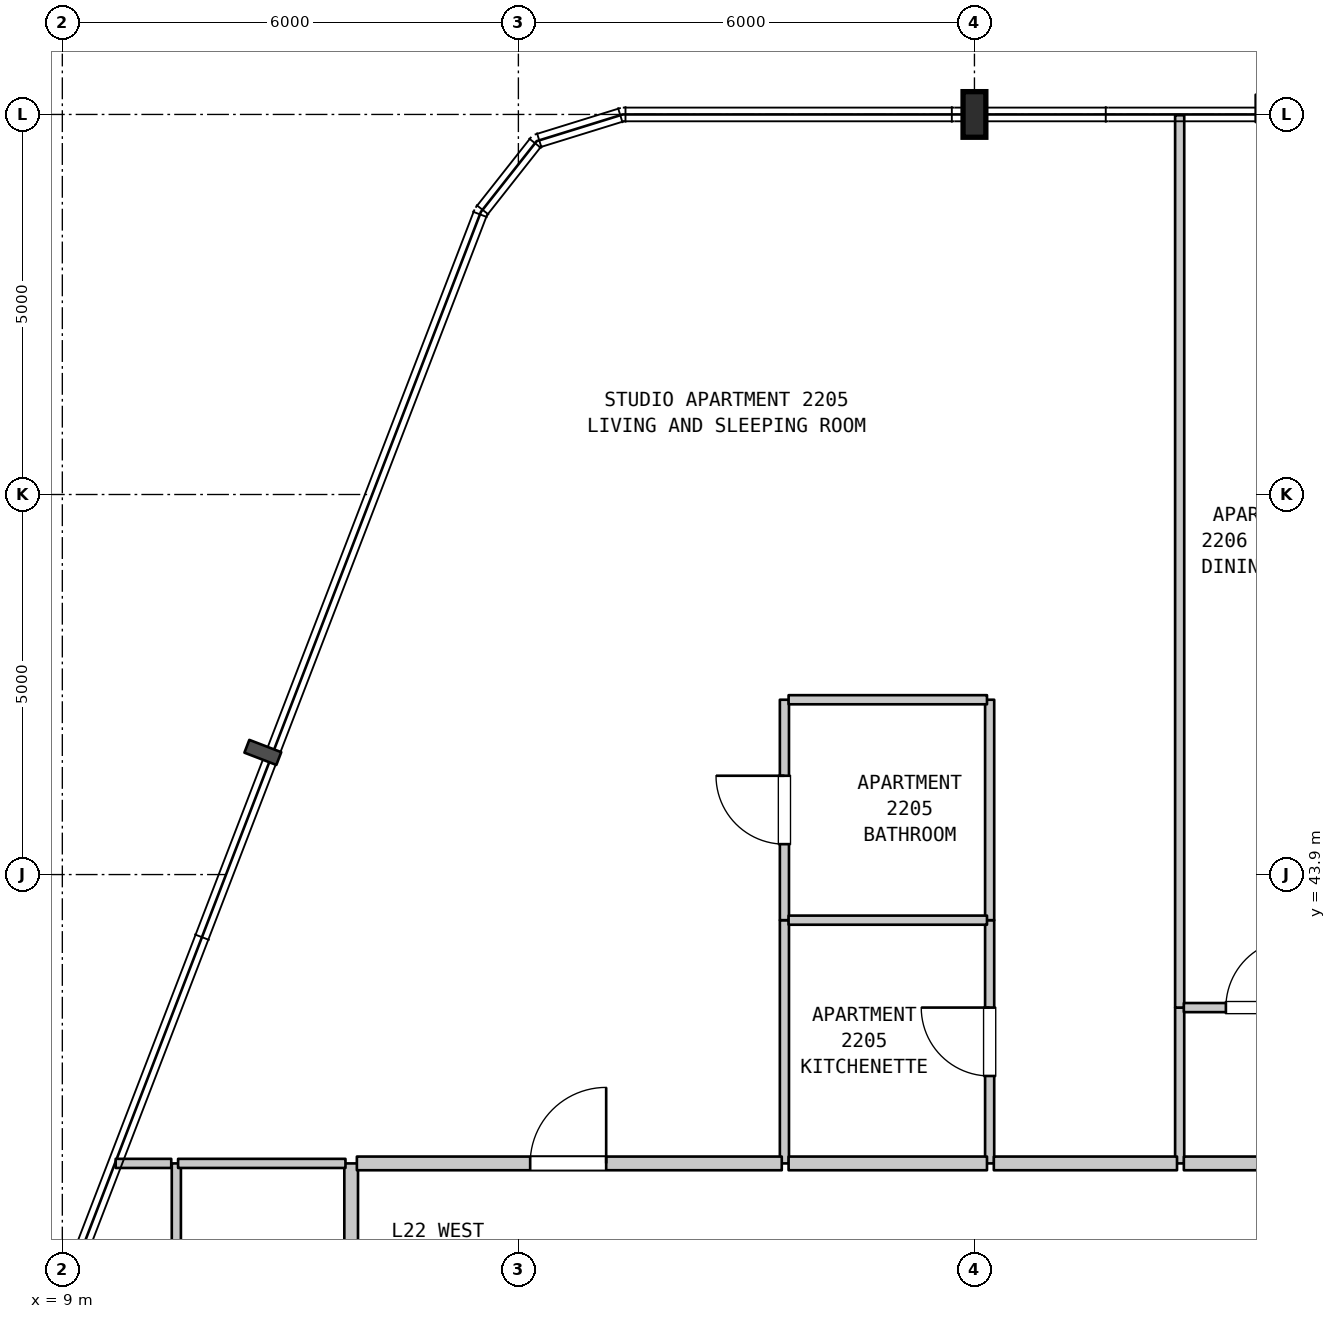
"""IFC4 building model, lengths in metres.
Left out: names, types, materials, properties, quantities, classifications, styles, units other than length and angle.
Written with IfcOpenShell. Run it as: python <this file> out.ifc"""

import sys

from ifc_helpers import new_model, si_unit, direction, frame, frame_2d, origin, origin_2d, place, context, subcontext, project, spatial, rectangle, i_section, extrude, element, fill, save


model = new_model("IFC4")
c1 = context("Model", 3, precision=1e-05, world=origin(), true_north=direction((0.0, 1.0)))
c2 = subcontext(c1, "Body", "Model", "MODEL_VIEW")
j1 = project(units=[si_unit("LENGTHUNIT", "METRE"), si_unit("PLANEANGLEUNIT", "RADIAN")], contexts=[c1])
p1 = place(None, origin())
s1 = spatial("IfcSite", under=j1, at=p1, CompositionType="ELEMENT")
p2 = place(p1, origin())
s2 = spatial("IfcBuilding", under=s1, at=p2, CompositionType="ELEMENT")
p3 = place(p2, frame((0.0, 0.0, 94.6)))
s3 = spatial("IfcBuildingStorey", under=s2, at=p3, CompositionType="ELEMENT", Elevation=94.6)
p4 = place(p3, frame((21.0, 53.9, 0.0), z_axis=(0.0, 0.0, 1.0), x_axis=(1.0, 0.0, 0.0)))
e1 = element("IfcColumn", 1, at=p4, inside=s3, PredefinedType="COLUMN", context=c2, shape_type="SweptSolid", body=[
    extrude(i_section(OverallWidth=0.3, OverallDepth=0.6, WebThickness=0.015, FlangeThickness=0.03, FilletRadius=0.027, at=origin_2d()), origin(), (0.0, 0.0, 1.0), 3.7),
])
p5 = place(p3, frame((10.5, 31.45, 0.0), z_axis=(0.0, 0.0, 1.0), x_axis=(0.0, 1.0, 0.0)))
e2 = element("IfcWall", 2, at=p5, inside=s3, PredefinedType="PARTITIONING", context=c2, shape_type="SweptSolid", body=[
    extrude(rectangle(XDim=8.65, YDim=0.12, at=frame_2d((4.325, 0.0))), origin(), (0.0, 0.0, 1.0), 3.385),
])
p6 = place(p3, frame((12.8, 31.45, 0.0), z_axis=(0.0, 0.0, 1.0), x_axis=(0.0, 1.0, 0.0)))
e3 = element("IfcWall", 3, at=p6, inside=s3, PredefinedType="STANDARD", context=c2, shape_type="SweptSolid", body=[
    extrude(rectangle(XDim=8.65, YDim=0.18, at=frame_2d((4.325, 0.0))), origin(), (0.0, 0.0, 1.0), 3.385),
])
p7 = place(p3, frame((18.5, 40.1, 0.0), z_axis=(0.0, 0.0, 1.0), x_axis=(0.0, 1.0, 0.0)))
e4 = element("IfcWall", 4, at=p7, inside=s3, PredefinedType="PARTITIONING", context=c2, shape_type="SweptSolid", body=[
    extrude(rectangle(XDim=3.2, YDim=0.12, at=frame_2d((1.6, 0.0))), origin(), (0.0, 0.0, 1.0), 3.385),
])
p8 = place(p3, frame((18.5, 43.3, 0.0), z_axis=(0.0, 0.0, 1.0), x_axis=(0.0, 1.0, 0.0)))
e5 = element("IfcWall", 5, at=p8, inside=s3, PredefinedType="PARTITIONING", context=c2, shape_type="SweptSolid", body=[
    extrude(rectangle(XDim=2.9, YDim=0.12, at=frame_2d((1.45, 0.0))), origin(), (0.0, 0.0, 1.0), 3.385),
])
p9 = place(p8, frame((1.0, 0.0, 0.0)))
e6 = element("IfcOpeningElement", 6, at=p9, cuts=e5, PredefinedType="OPENING", context=c2, shape_type="SweptSolid", body=[
    extrude(rectangle(XDim=0.9, YDim=2.1, at=frame_2d((0.45, 1.05))), frame((0.0, 0.07, 0.0), z_axis=(0.0, -1.0, 0.0), x_axis=(1.0, 0.0, 0.0)), (0.0, 0.0, 1.0), 0.14),
])
p10 = place(p3, frame((21.2, 40.1, 0.0), z_axis=(0.0, 0.0, 1.0), x_axis=(0.0, 1.0, 0.0)))
e7 = element("IfcWall", 7, at=p10, inside=s3, PredefinedType="PARTITIONING", context=c2, shape_type="SweptSolid", body=[
    extrude(rectangle(XDim=3.2, YDim=0.12, at=frame_2d((1.6, 0.0))), origin(), (0.0, 0.0, 1.0), 3.385),
])
p11 = place(p10, frame((1.15, 0.0, 0.0)))
e8 = element("IfcOpeningElement", 8, at=p11, cuts=e7, PredefinedType="OPENING", context=c2, shape_type="SweptSolid", body=[
    extrude(rectangle(XDim=0.9, YDim=2.15, at=frame_2d((0.45, 1.075))), frame((0.0, 0.07, 0.0), z_axis=(0.0, -1.0, 0.0), x_axis=(1.0, 0.0, 0.0)), (0.0, 0.0, 1.0), 0.14),
])
p12 = place(p3, frame((21.2, 43.3, 0.0), z_axis=(0.0, 0.0, 1.0), x_axis=(0.0, 1.0, 0.0)))
e9 = element("IfcWall", 9, at=p12, inside=s3, PredefinedType="PARTITIONING", context=c2, shape_type="SweptSolid", body=[
    extrude(rectangle(XDim=2.9, YDim=0.12, at=frame_2d((1.45, 0.0))), origin(), (0.0, 0.0, 1.0), 3.385),
])
p13 = place(p3, frame((23.7, 40.1, 0.0), z_axis=(0.0, 0.0, 1.0), x_axis=(0.0, 1.0, 0.0)))
e10 = element("IfcWall", 10, at=p13, inside=s3, PredefinedType="PARTITIONING", context=c2, shape_type="SweptSolid", body=[
    extrude(rectangle(XDim=2.05, YDim=0.12, at=frame_2d((1.025, 0.0))), origin(), (0.0, 0.0, 1.0), 3.385),
])
p14 = place(p3, frame((23.7, 42.15, 0.0), z_axis=(0.0, 0.0, 1.0), x_axis=(0.0, 1.0, 0.0)))
e11 = element("IfcWall", 11, at=p14, inside=s3, PredefinedType="PARTITIONING", context=c2, shape_type="SweptSolid", body=[
    extrude(rectangle(XDim=11.74, YDim=0.12, at=frame_2d((5.87, 0.0))), origin(), (0.0, 0.0, 1.0), 3.385),
])
p15 = place(p3, frame((9.702, 40.1, 0.0), z_axis=(0.0, 0.0, 1.0), x_axis=(1.0, 0.0, 0.0)))
e12 = element("IfcWall", 12, at=p15, inside=s3, PredefinedType="PARTITIONING", context=c2, shape_type="SweptSolid", body=[
    extrude(rectangle(XDim=0.731, YDim=0.12, at=frame_2d((0.366, 0.0))), origin(), (0.0, 0.0, 1.0), 3.385),
])
p16 = place(p3, frame((10.523, 40.1, 0.0), z_axis=(0.0, 0.0, 1.0), x_axis=(1.0, 0.0, 0.0)))
e13 = element("IfcWall", 13, at=p16, inside=s3, PredefinedType="PARTITIONING", context=c2, shape_type="SweptSolid", body=[
    extrude(rectangle(XDim=2.202, YDim=0.12, at=frame_2d((1.101, 0.0))), origin(), (0.0, 0.0, 1.0), 3.385),
])
p17 = place(p3, frame((12.875, 40.1, 0.0), z_axis=(0.0, 0.0, 1.0), x_axis=(1.0, 0.0, 0.0)))
e14 = element("IfcWall", 14, at=p17, inside=s3, PredefinedType="STANDARD", context=c2, shape_type="SweptSolid", body=[
    extrude(rectangle(XDim=5.59, YDim=0.18, at=frame_2d((2.795, 0.0))), origin(), (0.0, 0.0, 1.0), 3.385),
])
p18 = place(p17, frame((2.28, 0.0, 0.0)))
e15 = element("IfcOpeningElement", 15, at=p18, cuts=e14, PredefinedType="OPENING", context=c2, shape_type="SweptSolid", body=[
    extrude(rectangle(XDim=1.0, YDim=2.15, at=frame_2d((0.5, 1.075))), frame((0.0, 0.1, 0.0), z_axis=(0.0, -1.0, 0.0), x_axis=(1.0, 0.0, 0.0)), (0.0, 0.0, 1.0), 0.2),
])
p19 = place(p3, frame((18.555, 40.1, 0.0), z_axis=(0.0, 0.0, 1.0), x_axis=(1.0, 0.0, 0.0)))
e16 = element("IfcWall", 16, at=p19, inside=s3, PredefinedType="STANDARD", context=c2, shape_type="SweptSolid", body=[
    extrude(rectangle(XDim=2.61, YDim=0.18, at=frame_2d((1.305, 0.0))), origin(), (0.0, 0.0, 1.0), 3.385),
])
p20 = place(p3, frame((21.255, 40.1, 0.0), z_axis=(0.0, 0.0, 1.0), x_axis=(1.0, 0.0, 0.0)))
e17 = element("IfcWall", 17, at=p20, inside=s3, PredefinedType="STANDARD", context=c2, shape_type="SweptSolid", body=[
    extrude(rectangle(XDim=2.41, YDim=0.18, at=frame_2d((1.205, 0.0))), origin(), (0.0, 0.0, 1.0), 3.385),
])
p21 = place(p3, frame((23.755, 40.1, 0.0), z_axis=(0.0, 0.0, 1.0), x_axis=(1.0, 0.0, 0.0)))
e18 = element("IfcWall", 18, at=p21, inside=s3, PredefinedType="STANDARD", context=c2, shape_type="SweptSolid", body=[
    extrude(rectangle(XDim=5.095, YDim=0.18, at=frame_2d((2.548, 0.0))), origin(), (0.0, 0.0, 1.0), 3.385),
])
p22 = place(p21, frame((2.08, 0.0, 0.0)))
e19 = element("IfcOpeningElement", 19, at=p22, cuts=e18, PredefinedType="OPENING", context=c2, shape_type="SweptSolid", body=[
    extrude(rectangle(XDim=1.0, YDim=2.15, at=frame_2d((0.5, 1.075))), frame((0.0, 0.1, 0.0), z_axis=(0.0, -1.0, 0.0), x_axis=(1.0, 0.0, 0.0)), (0.0, 0.0, 1.0), 0.2),
])
p23 = place(p3, frame((23.755, 42.15, 0.0), z_axis=(0.0, 0.0, 1.0), x_axis=(1.0, 0.0, 0.0)))
e20 = element("IfcWall", 20, at=p23, inside=s3, PredefinedType="PARTITIONING", context=c2, shape_type="SweptSolid", body=[
    extrude(rectangle(XDim=2.16, YDim=0.12, at=frame_2d((1.08, 0.0))), origin(), (0.0, 0.0, 1.0), 3.385),
])
p24 = place(p23, frame((0.553, 0.0, 0.0)))
e21 = element("IfcOpeningElement", 21, at=p24, cuts=e20, PredefinedType="OPENING", context=c2, shape_type="SweptSolid", body=[
    extrude(rectangle(XDim=0.9, YDim=2.15, at=frame_2d((0.45, 1.075))), frame((0.0, 0.07, 0.0), z_axis=(0.0, -1.0, 0.0), x_axis=(1.0, 0.0, 0.0)), (0.0, 0.0, 1.0), 0.14),
])
for number, where, z_axis, x_axis in (
    (22, (18.555, 43.3, 0.0), (0.0, 0.0, 1.0), (1.0, 0.0, 0.0)),
    (23, (18.555, 46.2, 0.0), (0.0, 0.0, 1.0), (1.0, 0.0, 0.0)),
):
    element("IfcWall", number, at=place(p3, frame(where, z_axis=z_axis, x_axis=x_axis)), inside=s3, PredefinedType="PARTITIONING", context=c2, shape_type="SweptSolid", body=[
        extrude(rectangle(XDim=2.61, YDim=0.12, at=frame_2d((1.305, 0.0))), origin(), (0.0, 0.0, 1.0), 3.385),
    ])
p25 = place(p9, origin())
e24 = element("IfcDoor", 24, at=p25, inside=s3, OperationType="SINGLE_SWING_RIGHT", PredefinedType="DOOR", context=c2, shape_type="SweptSolid", body=[
    extrude(rectangle(XDim=0.9, YDim=2.1, at=frame_2d((0.45, 1.05))), frame((0.0, 0.025, 0.0), z_axis=(0.0, -1.0, 0.0), x_axis=(1.0, 0.0, 0.0)), (0.0, 0.0, 1.0), 0.05),
])
fill(e6, e24)
p26 = place(p11, origin())
e25 = element("IfcDoor", 25, at=p26, inside=s3, OperationType="SINGLE_SWING_RIGHT", PredefinedType="DOOR", context=c2, shape_type="SweptSolid", body=[
    extrude(rectangle(XDim=0.9, YDim=2.15, at=frame_2d((0.45, 1.075))), frame((0.0, 0.025, 0.0), z_axis=(0.0, -1.0, 0.0), x_axis=(1.0, 0.0, 0.0)), (0.0, 0.0, 1.0), 0.05),
])
fill(e8, e25)
p27 = place(p18, origin())
e26 = element("IfcDoor", 26, at=p27, inside=s3, OperationType="SINGLE_SWING_RIGHT", PredefinedType="DOOR", context=c2, shape_type="SweptSolid", body=[
    extrude(rectangle(XDim=1.0, YDim=2.15, at=frame_2d((0.5, 1.075))), frame((0.0, 0.025, 0.0), z_axis=(0.0, -1.0, 0.0), x_axis=(1.0, 0.0, 0.0)), (0.0, 0.0, 1.0), 0.05),
])
fill(e15, e26)
p28 = place(p24, origin())
e27 = element("IfcDoor", 27, at=p28, inside=s3, OperationType="SINGLE_SWING_RIGHT", PredefinedType="DOOR", context=c2, shape_type="SweptSolid", body=[
    extrude(rectangle(XDim=0.9, YDim=2.15, at=frame_2d((0.45, 1.075))), frame((0.0, 0.025, 0.0), z_axis=(0.0, -1.0, 0.0), x_axis=(1.0, 0.0, 0.0)), (0.0, 0.0, 1.0), 0.05),
])
fill(e21, e27)
save(model, sys.argv[1])
